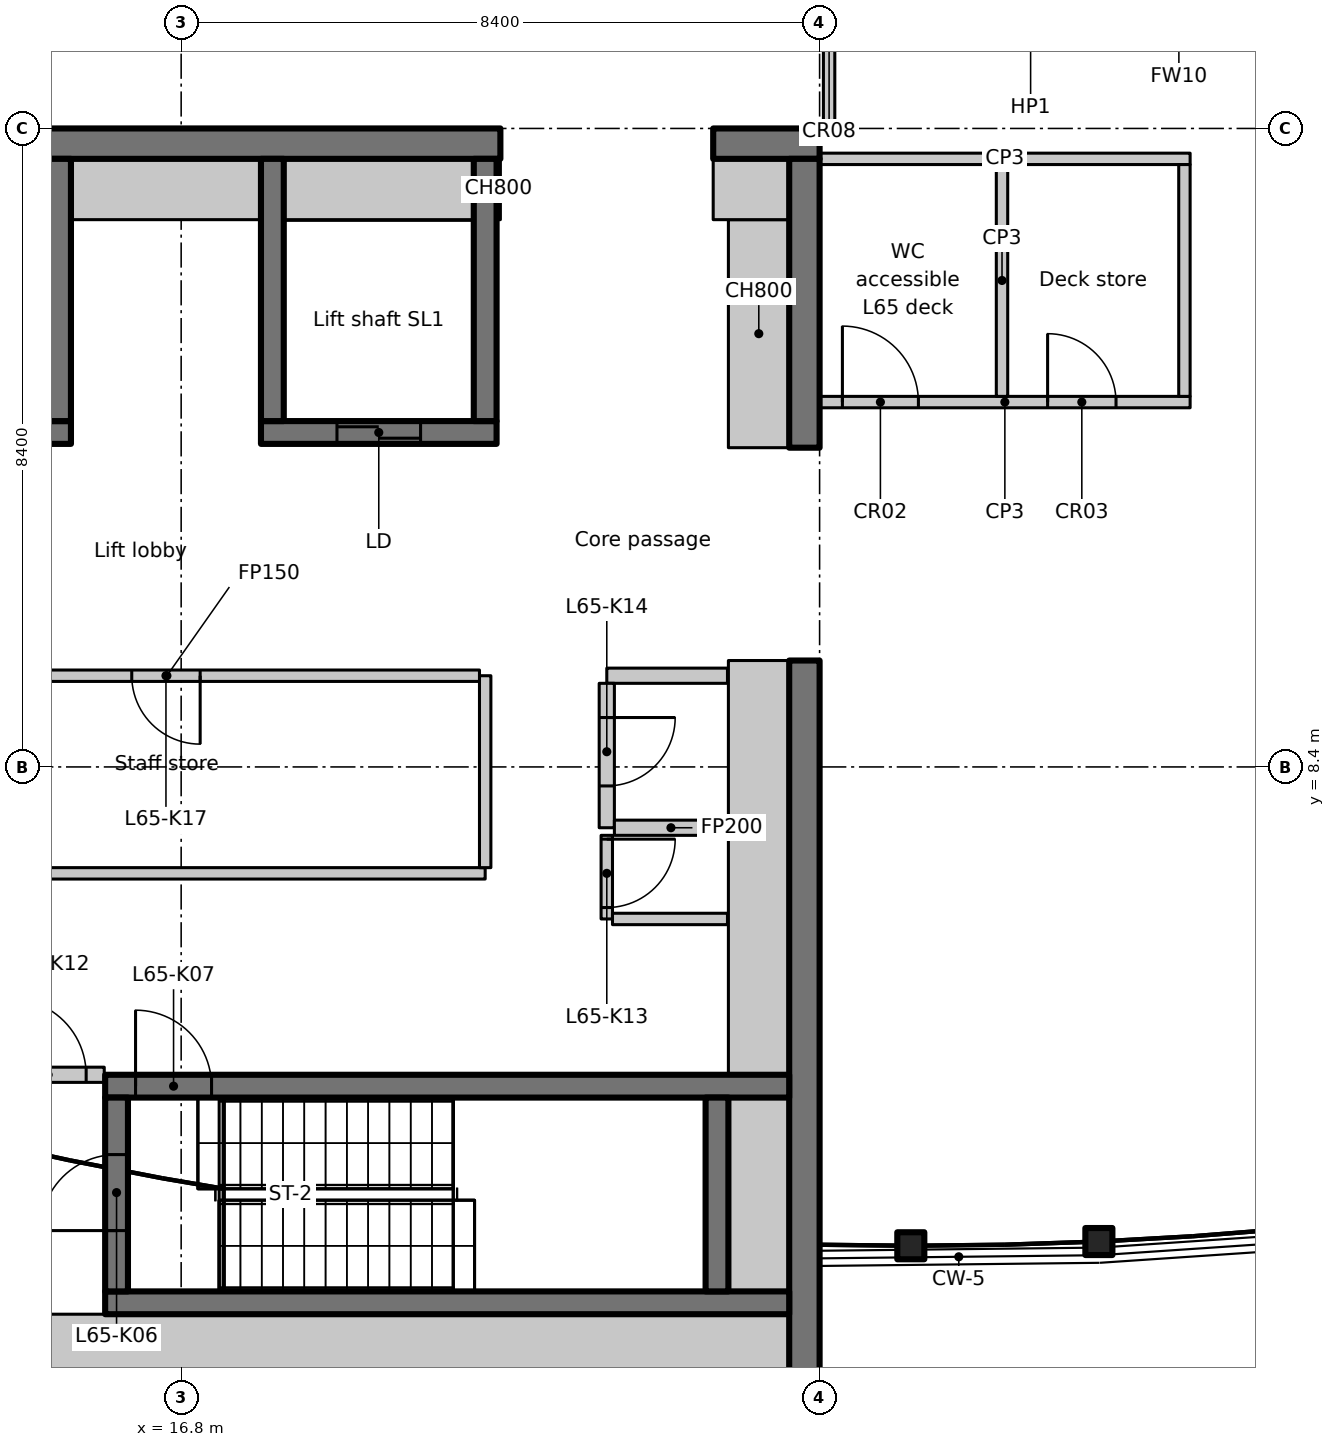
"""IFC4 building model, lengths in metres.
Left out: names, types, materials, properties, quantities, classifications, styles, units other than length and angle.
Written with IfcOpenShell. Run it as: python <this file> out.ifc"""

import sys

from ifc_helpers import new_model, si_unit, direction, frame, frame_2d, origin, origin_2d, place, context, subcontext, project, spatial, rectangle, hollow_circle, extrude, element, fill, save


model = new_model("IFC4")
c1 = context("Model", 3, precision=1e-05, world=origin(), true_north=direction((0.0, 1.0)))
c2 = subcontext(c1, "Body", "Model", "MODEL_VIEW")
j1 = project(units=[si_unit("LENGTHUNIT", "METRE"), si_unit("PLANEANGLEUNIT", "RADIAN")], contexts=[c1])
p1 = place(None, origin())
s1 = spatial("IfcSite", under=j1, at=p1, CompositionType="ELEMENT")
p2 = place(p1, origin())
s2 = spatial("IfcBuilding", under=s1, at=p2, CompositionType="ELEMENT")
p3 = place(p2, frame((0.0, 0.0, 256.2)))
s3 = spatial("IfcBuildingStorey", under=s2, at=p3, CompositionType="ELEMENT", Elevation=256.2)
for number, where, z_axis, x_axis in (
    (1, (28.875, 2.156, 0.0), (0.0, 0.0, 1.0), (1.0, 0.0, 0.0)),
    (2, (26.4, 2.1, 0.0), (0.0, 0.0, 1.0), (1.0, 0.0, 0.0)),
):
    element("IfcColumn", number, at=place(p3, frame(where, z_axis=z_axis, x_axis=x_axis)), inside=s3, PredefinedType="COLUMN", context=c2, shape_type="SweptSolid", body=[
        extrude(hollow_circle(Radius=0.178, WallThickness=0.012, at=origin_2d()), origin(), (0.0, 0.0, 1.0), 7.7),
    ])
p4 = place(p3, frame((-1.1, 16.6, 0.0), z_axis=(0.0, 0.0, 1.0), x_axis=(1.0, 0.0, 0.0)))
e3 = element("IfcWall", 3, at=p4, inside=s3, PredefinedType="SHEAR", context=c2, shape_type="SweptSolid", body=[
    extrude(rectangle(XDim=22.1, YDim=0.4, at=frame_2d((11.05, 0.0))), origin(), (0.0, 0.0, 1.0), 7.7),
])
p5 = place(p4, frame((3.15, 0.0, 0.0)))
e4 = element("IfcOpeningElement", 4, at=p5, cuts=e3, PredefinedType="OPENING", context=c2, shape_type="SweptSolid", body=[
    extrude(rectangle(XDim=1.1, YDim=2.3, at=frame_2d((0.55, 1.15))), frame((0.0, 0.21, 0.0), z_axis=(0.0, -1.0, 0.0), x_axis=(1.0, 0.0, 0.0)), (0.0, 0.0, 1.0), 0.42),
])
p6 = place(p3, frame((23.8, 16.6, 0.0), z_axis=(0.0, 0.0, 1.0), x_axis=(1.0, 0.0, 0.0)))
e5 = element("IfcWall", 5, at=p6, inside=s3, PredefinedType="SHEAR", context=c2, shape_type="SweptSolid", body=[
    extrude(rectangle(XDim=1.4, YDim=0.4, at=frame_2d((0.7, 0.0))), origin(), (0.0, 0.0, 1.0), 7.7),
])
p7 = place(p3, frame((25.0, 0.4, 0.0), z_axis=(0.0, 0.0, 1.0), x_axis=(0.0, 1.0, 0.0)))
e6 = element("IfcWall", 6, at=p7, inside=s3, PredefinedType="SHEAR", context=c2, shape_type="SweptSolid", body=[
    extrude(rectangle(XDim=9.4, YDim=0.4, at=frame_2d((4.7, 0.0))), origin(), (0.0, 0.0, 1.0), 7.7),
])
p8 = place(p3, frame((25.0, 12.6, 0.0), z_axis=(0.0, 0.0, 1.0), x_axis=(0.0, 1.0, 0.0)))
e7 = element("IfcWall", 7, at=p8, inside=s3, PredefinedType="SHEAR", context=c2, shape_type="SweptSolid", body=[
    extrude(rectangle(XDim=3.8, YDim=0.4, at=frame_2d((1.9, 0.0))), origin(), (0.0, 0.0, 1.0), 7.7),
])
p9 = place(p3, frame((24.4, 12.6, 0.0), z_axis=(0.0, 0.0, 1.0), x_axis=(0.0, 1.0, 0.0)))
e8 = element("IfcWall", 8, at=p9, inside=s3, PredefinedType="PARTITIONING", context=c2, shape_type="SweptSolid", body=[
    extrude(rectangle(XDim=3.0, YDim=0.8, at=frame_2d((1.5, 0.0))), origin(), (0.0, 0.0, 1.0), 7.7),
])
p10 = place(p3, frame((23.8, 16.0, 0.0), z_axis=(0.0, 0.0, 1.0), x_axis=(1.0, 0.0, 0.0)))
e9 = element("IfcWall", 9, at=p10, inside=s3, PredefinedType="PARTITIONING", context=c2, shape_type="SweptSolid", body=[
    extrude(rectangle(XDim=1.0, YDim=0.8, at=frame_2d((0.5, 0.0))), origin(), (0.0, 0.0, 1.0), 7.7),
])
p11 = place(p3, frame((0.4, 12.8, 0.0), z_axis=(0.0, 0.0, 1.0), x_axis=(1.0, 0.0, 0.0)))
e10 = element("IfcWall", 10, at=p11, inside=s3, PredefinedType="SHEAR", context=c2, shape_type="SweptSolid", body=[
    extrude(rectangle(XDim=14.95, YDim=0.3, at=frame_2d((7.475, 0.0))), origin(), (0.0, 0.0, 1.0), 7.7),
])
p12 = place(p3, frame((15.2, 12.95, 0.0), z_axis=(0.0, 0.0, 1.0), x_axis=(0.0, 1.0, 0.0)))
e11 = element("IfcWall", 11, at=p12, inside=s3, PredefinedType="SHEAR", context=c2, shape_type="SweptSolid", body=[
    extrude(rectangle(XDim=3.45, YDim=0.3, at=frame_2d((1.725, 0.0))), origin(), (0.0, 0.0, 1.0), 7.7),
])
p13 = place(p3, frame((17.85, 12.8, 0.0), z_axis=(0.0, 0.0, 1.0), x_axis=(1.0, 0.0, 0.0)))
e12 = element("IfcWall", 12, at=p13, inside=s3, PredefinedType="SHEAR", context=c2, shape_type="SweptSolid", body=[
    extrude(rectangle(XDim=3.1, YDim=0.3, at=frame_2d((1.55, 0.0))), origin(), (0.0, 0.0, 1.0), 7.7),
])
p14 = place(p13, frame((1.0, 0.0, 0.0)))
e13 = element("IfcOpeningElement", 13, at=p14, cuts=e12, PredefinedType="OPENING", context=c2, shape_type="SweptSolid", body=[
    extrude(rectangle(XDim=1.1, YDim=2.3, at=frame_2d((0.55, 1.15))), frame((0.0, 0.16, 0.0), z_axis=(0.0, -1.0, 0.0), x_axis=(1.0, 0.0, 0.0)), (0.0, 0.0, 1.0), 0.32),
])
for number, where, z_axis, x_axis in (
    (14, (18.0, 12.95, 0.0), (0.0, 0.0, 1.0), (0.0, 1.0, 0.0)),
    (15, (20.8, 12.95, 0.0), (0.0, 0.0, 1.0), (0.0, 1.0, 0.0)),
):
    element("IfcWall", number, at=place(p3, frame(where, z_axis=z_axis, x_axis=x_axis)), inside=s3, PredefinedType="SHEAR", context=c2, shape_type="SweptSolid", body=[
        extrude(rectangle(XDim=3.45, YDim=0.3, at=frame_2d((1.725, 0.0))), origin(), (0.0, 0.0, 1.0), 7.7),
    ])
p15 = place(p3, frame((15.8, 1.35, 0.0), z_axis=(0.0, 0.0, 1.0), x_axis=(1.0, 0.0, 0.0)))
e16 = element("IfcWall", 16, at=p15, inside=s3, PredefinedType="SHEAR", context=c2, shape_type="SweptSolid", body=[
    extrude(rectangle(XDim=9.0, YDim=0.3, at=frame_2d((4.5, 0.0))), origin(), (0.0, 0.0, 1.0), 7.7),
])
p16 = place(p3, frame((15.8, 4.2, 0.0), z_axis=(0.0, 0.0, 1.0), x_axis=(1.0, 0.0, 0.0)))
e17 = element("IfcWall", 17, at=p16, inside=s3, PredefinedType="SHEAR", context=c2, shape_type="SweptSolid", body=[
    extrude(rectangle(XDim=9.0, YDim=0.3, at=frame_2d((4.5, 0.0))), origin(), (0.0, 0.0, 1.0), 7.7),
])
p17 = place(p16, frame((0.4, 0.0, 0.0)))
e18 = element("IfcOpeningElement", 18, at=p17, cuts=e17, PredefinedType="OPENING", context=c2, shape_type="SweptSolid", body=[
    extrude(rectangle(XDim=1.0, YDim=2.1, at=frame_2d((0.5, 1.05))), frame((0.0, 0.16, 0.0), z_axis=(0.0, -1.0, 0.0), x_axis=(1.0, 0.0, 0.0)), (0.0, 0.0, 1.0), 0.32),
])
p18 = place(p3, frame((15.95, 1.5, 0.0), z_axis=(0.0, 0.0, 1.0), x_axis=(0.0, 1.0, 0.0)))
e19 = element("IfcWall", 19, at=p18, inside=s3, PredefinedType="SHEAR", context=c2, shape_type="SweptSolid", body=[
    extrude(rectangle(XDim=2.55, YDim=0.3, at=frame_2d((1.275, 0.0))), origin(), (0.0, 0.0, 1.0), 7.7),
])
p19 = place(p18, frame((0.8, 0.0, 0.0)))
e20 = element("IfcOpeningElement", 20, at=p19, cuts=e19, PredefinedType="OPENING", context=c2, shape_type="SweptSolid", body=[
    extrude(rectangle(XDim=1.0, YDim=2.1, at=frame_2d((0.5, 1.05))), frame((0.0, 0.16, 0.0), z_axis=(0.0, -1.0, 0.0), x_axis=(1.0, 0.0, 0.0)), (0.0, 0.0, 1.0), 0.32),
])
p20 = place(p3, frame((23.85, 1.5, 0.0), z_axis=(0.0, 0.0, 1.0), x_axis=(0.0, 1.0, 0.0)))
e21 = element("IfcWall", 21, at=p20, inside=s3, PredefinedType="SHEAR", context=c2, shape_type="SweptSolid", body=[
    extrude(rectangle(XDim=2.55, YDim=0.3, at=frame_2d((1.275, 0.0))), origin(), (0.0, 0.0, 1.0), 7.7),
])
p21 = place(p3, frame((13.362, 4.35, 0.0), z_axis=(0.0, 0.0, 1.0), x_axis=(1.0, 0.0, 0.0)))
e22 = element("IfcWall", 22, at=p21, inside=s3, PredefinedType="PARTITIONING", context=c2, shape_type="SweptSolid", body=[
    extrude(rectangle(XDim=2.426, YDim=0.2, at=frame_2d((1.213, 0.0))), origin(), (0.0, 0.0, 1.0), 7.7),
])
p22 = place(p21, frame((1.188, 0.0, 0.0)))
e23 = element("IfcOpeningElement", 23, at=p22, cuts=e22, PredefinedType="OPENING", context=c2, shape_type="SweptSolid", body=[
    extrude(rectangle(XDim=1.0, YDim=2.1, at=frame_2d((0.5, 1.05))), frame((0.0, 0.11, 0.0), z_axis=(0.0, -1.0, 0.0), x_axis=(1.0, 0.0, 0.0)), (0.0, 0.0, 1.0), 0.22),
])
p23 = place(p3, frame((23.988, 9.6, 0.0), z_axis=(0.0, 0.0, 1.0), x_axis=(-1.0, 0.0, 0.0)))
e24 = element("IfcWall", 24, at=p23, inside=s3, PredefinedType="PARTITIONING", context=c2, shape_type="SweptSolid", body=[
    extrude(rectangle(XDim=1.588, YDim=0.2, at=frame_2d((0.794, 0.0))), origin(), (0.0, 0.0, 1.0), 7.7),
])
p24 = place(p3, frame((22.4, 9.5, 0.0), z_axis=(0.0, 0.0, 1.0), x_axis=(0.0, -1.0, 0.0)))
e25 = element("IfcWall", 25, at=p24, inside=s3, PredefinedType="PARTITIONING", context=c2, shape_type="SweptSolid", body=[
    extrude(rectangle(XDim=1.9, YDim=0.2, at=frame_2d((0.95, 0.0))), origin(), (0.0, 0.0, 1.0), 7.7),
])
p25 = place(p24, frame((0.45, 0.0, 0.0)))
e26 = element("IfcOpeningElement", 26, at=p25, cuts=e25, PredefinedType="OPENING", context=c2, shape_type="SweptSolid", body=[
    extrude(rectangle(XDim=0.9, YDim=2.1, at=frame_2d((0.45, 1.05))), frame((0.0, 0.11, 0.0), z_axis=(0.0, -1.0, 0.0), x_axis=(1.0, 0.0, 0.0)), (0.0, 0.0, 1.0), 0.22),
])
p26 = place(p3, frame((22.5, 7.6, 0.0), z_axis=(0.0, 0.0, 1.0), x_axis=(1.0, 0.0, 0.0)))
e27 = element("IfcWall", 27, at=p26, inside=s3, PredefinedType="PARTITIONING", context=c2, shape_type="SweptSolid", body=[
    extrude(rectangle(XDim=1.488, YDim=0.2, at=frame_2d((0.744, 0.0))), origin(), (0.0, 0.0, 1.0), 7.7),
])
p27 = place(p3, frame((12.5, 7.0, 0.0), z_axis=(0.0, 0.0, 1.0), x_axis=(1.0, 0.0, 0.0)))
e28 = element("IfcWall", 28, at=p27, inside=s3, PredefinedType="PARTITIONING", context=c2, shape_type="SweptSolid", body=[
    extrude(rectangle(XDim=8.3, YDim=0.15, at=frame_2d((4.15, 0.0))), origin(), (0.0, 0.0, 1.0), 7.7),
])
p28 = place(p3, frame((20.8, 7.075, 0.0), z_axis=(0.0, 0.0, 1.0), x_axis=(0.0, 1.0, 0.0)))
e29 = element("IfcWall", 29, at=p28, inside=s3, PredefinedType="PARTITIONING", context=c2, shape_type="SweptSolid", body=[
    extrude(rectangle(XDim=2.525, YDim=0.15, at=frame_2d((1.263, 0.0))), origin(), (0.0, 0.0, 1.0), 7.7),
])
p29 = place(p3, frame((20.725, 9.6, 0.0), z_axis=(0.0, 0.0, 1.0), x_axis=(-1.0, 0.0, 0.0)))
e30 = element("IfcWall", 30, at=p29, inside=s3, PredefinedType="PARTITIONING", context=c2, shape_type="SweptSolid", body=[
    extrude(rectangle(XDim=8.225, YDim=0.15, at=frame_2d((4.113, 0.0))), origin(), (0.0, 0.0, 1.0), 7.7),
])
p30 = place(p29, frame((3.675, 0.0, 0.0)))
e31 = element("IfcOpeningElement", 31, at=p30, cuts=e30, PredefinedType="OPENING", context=c2, shape_type="SweptSolid", body=[
    extrude(rectangle(XDim=0.9, YDim=2.1, at=frame_2d((0.45, 1.05))), frame((0.0, 0.085, 0.0), z_axis=(0.0, -1.0, 0.0), x_axis=(1.0, 0.0, 0.0)), (0.0, 0.0, 1.0), 0.17),
])
p31 = place(p3, frame((22.4, 7.5, 0.0), z_axis=(0.0, 0.0, 1.0), x_axis=(0.0, -1.0, 0.0)))
e32 = element("IfcWall", 32, at=p31, inside=s3, PredefinedType="PARTITIONING", context=c2, shape_type="SweptSolid", body=[
    extrude(rectangle(XDim=1.1, YDim=0.15, at=frame_2d((0.55, 0.0))), origin(), (0.0, 0.0, 1.0), 7.7),
])
p32 = place(p31, frame((0.05, 0.0, 0.0)))
e33 = element("IfcOpeningElement", 33, at=p32, cuts=e32, PredefinedType="OPENING", context=c2, shape_type="SweptSolid", body=[
    extrude(rectangle(XDim=0.9, YDim=2.1, at=frame_2d((0.45, 1.05))), frame((0.0, 0.085, 0.0), z_axis=(0.0, -1.0, 0.0), x_axis=(1.0, 0.0, 0.0)), (0.0, 0.0, 1.0), 0.17),
])
p33 = place(p3, frame((22.475, 6.4, 0.0), z_axis=(0.0, 0.0, 1.0), x_axis=(1.0, 0.0, 0.0)))
e34 = element("IfcWall", 34, at=p33, inside=s3, PredefinedType="PARTITIONING", context=c2, shape_type="SweptSolid", body=[
    extrude(rectangle(XDim=1.513, YDim=0.15, at=frame_2d((0.756, 0.0))), origin(), (0.0, 0.0, 1.0), 7.7),
])
for number, where, z_axis, x_axis in (
    (35, (15.35, 16.0, 0.0), (0.0, 0.0, 1.0), (1.0, 0.0, 0.0)),
    (36, (18.15, 16.0, 0.0), (0.0, 0.0, 1.0), (1.0, 0.0, 0.0)),
):
    element("IfcWall", number, at=place(p3, frame(where, z_axis=z_axis, x_axis=x_axis)), inside=s3, PredefinedType="PARTITIONING", context=c2, shape_type="SweptSolid", body=[
        extrude(rectangle(XDim=2.5, YDim=0.8, at=frame_2d((1.25, 0.0))), origin(), (0.0, 0.0, 1.0), 7.7),
    ])
p34 = place(p3, frame((20.95, 16.0, 0.0), z_axis=(0.0, 0.0, 1.0), x_axis=(1.0, 0.0, 0.0)))
e37 = element("IfcWall", 37, at=p34, inside=s3, PredefinedType="PARTITIONING", context=c2, shape_type="SweptSolid", body=[
    extrude(rectangle(XDim=0.05, YDim=0.8, at=frame_2d((0.025, 0.0))), origin(), (0.0, 0.0, 1.0), 7.7),
])
p35 = place(p3, frame((13.35, 0.8, 0.0), z_axis=(0.0, 0.0, 1.0), x_axis=(1.0, 0.0, 0.0)))
e38 = element("IfcWall", 38, at=p35, inside=s3, PredefinedType="PARTITIONING", context=c2, shape_type="SweptSolid", body=[
    extrude(rectangle(XDim=11.45, YDim=0.8, at=frame_2d((5.725, 0.0))), origin(), (0.0, 0.0, 1.0), 7.7),
])
p36 = place(p3, frame((24.4, 1.5, 0.0), z_axis=(0.0, 0.0, 1.0), x_axis=(0.0, 1.0, 0.0)))
e39 = element("IfcWall", 39, at=p36, inside=s3, PredefinedType="PARTITIONING", context=c2, shape_type="SweptSolid", body=[
    extrude(rectangle(XDim=2.55, YDim=0.8, at=frame_2d((1.275, 0.0))), origin(), (0.0, 0.0, 1.0), 7.7),
])
p37 = place(p3, frame((24.4, 4.35, 0.0), z_axis=(0.0, 0.0, 1.0), x_axis=(0.0, 1.0, 0.0)))
e40 = element("IfcWall", 40, at=p37, inside=s3, PredefinedType="PARTITIONING", context=c2, shape_type="SweptSolid", body=[
    extrude(rectangle(XDim=5.45, YDim=0.8, at=frame_2d((2.725, 0.0))), origin(), (0.0, 0.0, 1.0), 7.7),
])
p38 = place(p3, frame((25.2, 13.2, 0.0), z_axis=(0.0, 0.0, 1.0), x_axis=(1.0, 0.0, 0.0)))
e41 = element("IfcWall", 41, at=p38, inside=s3, PredefinedType="PARTITIONING", context=c2, shape_type="SweptSolid", body=[
    extrude(rectangle(XDim=4.875, YDim=0.15, at=frame_2d((2.438, 0.0))), origin(), (0.0, 0.0, 1.0), 7.7),
])
p39 = place(p38, frame((0.3, 0.0, 0.0)))
e42 = element("IfcOpeningElement", 42, at=p39, cuts=e41, PredefinedType="OPENING", context=c2, shape_type="SweptSolid", body=[
    extrude(rectangle(XDim=1.0, YDim=2.1, at=frame_2d((0.5, 1.05))), frame((0.0, 0.085, 0.0), z_axis=(0.0, -1.0, 0.0), x_axis=(1.0, 0.0, 0.0)), (0.0, 0.0, 1.0), 0.17),
])
p40 = place(p38, frame((3.0, 0.0, 0.0)))
e43 = element("IfcOpeningElement", 43, at=p40, cuts=e41, PredefinedType="OPENING", context=c2, shape_type="SweptSolid", body=[
    extrude(rectangle(XDim=0.9, YDim=2.1, at=frame_2d((0.45, 1.05))), frame((0.0, 0.085, 0.0), z_axis=(0.0, -1.0, 0.0), x_axis=(1.0, 0.0, 0.0)), (0.0, 0.0, 1.0), 0.17),
])
p41 = place(p3, frame((25.2, 16.4, 0.0), z_axis=(0.0, 0.0, 1.0), x_axis=(1.0, 0.0, 0.0)))
e44 = element("IfcWall", 44, at=p41, inside=s3, PredefinedType="PARTITIONING", context=c2, shape_type="SweptSolid", body=[
    extrude(rectangle(XDim=4.875, YDim=0.15, at=frame_2d((2.438, 0.0))), origin(), (0.0, 0.0, 1.0), 7.7),
])
for number, where, z_axis, x_axis in (
    (45, (30.0, 13.275, 0.0), (0.0, 0.0, 1.0), (0.0, 1.0, 0.0)),
    (46, (27.6, 13.275, 0.0), (0.0, 0.0, 1.0), (0.0, 1.0, 0.0)),
):
    element("IfcWall", number, at=place(p3, frame(where, z_axis=z_axis, x_axis=x_axis)), inside=s3, PredefinedType="PARTITIONING", context=c2, shape_type="SweptSolid", body=[
        extrude(rectangle(XDim=3.05, YDim=0.15, at=frame_2d((1.525, 0.0))), origin(), (0.0, 0.0, 1.0), 7.7),
    ])
p42 = place(p3, frame((25.325, 16.6, 0.0), z_axis=(0.0, 0.0, 1.0), x_axis=(0.0, 1.0, 0.0)))
e47 = element("IfcWall", 47, at=p42, inside=s3, PredefinedType="PARTITIONING", context=c2, shape_type="SweptSolid", body=[
    extrude(rectangle(XDim=4.1, YDim=0.15, at=frame_2d((2.05, 0.0))), origin(), (0.0, 0.0, 1.0), 7.7),
])
p43 = place(p42, frame((1.55, 0.0, 0.0)))
e48 = element("IfcOpeningElement", 48, at=p43, cuts=e47, PredefinedType="OPENING", context=c2, shape_type="SweptSolid", body=[
    extrude(rectangle(XDim=1.0, YDim=2.1, at=frame_2d((0.5, 1.05))), frame((0.0, 0.085, 0.0), z_axis=(0.0, -1.0, 0.0), x_axis=(1.0, 0.0, 0.0)), (0.0, 0.0, 1.0), 0.17),
])
p44 = place(p14, origin())
e49 = element("IfcDoor", 49, at=p44, inside=s3, OperationType="SLIDING_TO_LEFT", PredefinedType="DOOR", context=c2, shape_type="SweptSolid", body=[
    extrude(rectangle(XDim=1.1, YDim=2.3, at=frame_2d((0.55, 1.15))), frame((0.0, 0.025, 0.0), z_axis=(0.0, -1.0, 0.0), x_axis=(1.0, 0.0, 0.0)), (0.0, 0.0, 1.0), 0.05),
])
fill(e13, e49)
p45 = place(p19, origin())
e50 = element("IfcDoor", 50, at=p45, inside=s3, OperationType="SINGLE_SWING_LEFT", PredefinedType="DOOR", context=c2, shape_type="SweptSolid", body=[
    extrude(rectangle(XDim=1.0, YDim=2.1, at=frame_2d((0.5, 1.05))), frame((0.0, 0.025, 0.0), z_axis=(0.0, -1.0, 0.0), x_axis=(1.0, 0.0, 0.0)), (0.0, 0.0, 1.0), 0.05),
])
fill(e20, e50)
p46 = place(p17, origin())
e51 = element("IfcDoor", 51, at=p46, inside=s3, OperationType="SINGLE_SWING_RIGHT", PredefinedType="DOOR", context=c2, shape_type="SweptSolid", body=[
    extrude(rectangle(XDim=1.0, YDim=2.1, at=frame_2d((0.5, 1.05))), frame((0.0, 0.025, 0.0), z_axis=(0.0, -1.0, 0.0), x_axis=(1.0, 0.0, 0.0)), (0.0, 0.0, 1.0), 0.05),
])
fill(e18, e51)
p47 = place(p22, origin())
e52 = element("IfcDoor", 52, at=p47, inside=s3, OperationType="SINGLE_SWING_LEFT", PredefinedType="DOOR", context=c2, shape_type="SweptSolid", body=[
    extrude(rectangle(XDim=1.0, YDim=2.1, at=frame_2d((0.5, 1.05))), frame((0.0, 0.025, 0.0), z_axis=(0.0, -1.0, 0.0), x_axis=(1.0, 0.0, 0.0)), (0.0, 0.0, 1.0), 0.05),
])
fill(e23, e52)
p48 = place(p32, origin())
e53 = element("IfcDoor", 53, at=p48, inside=s3, OperationType="SINGLE_SWING_RIGHT", PredefinedType="DOOR", context=c2, shape_type="SweptSolid", body=[
    extrude(rectangle(XDim=0.9, YDim=2.1, at=frame_2d((0.45, 1.05))), frame((0.0, 0.025, 0.0), z_axis=(0.0, -1.0, 0.0), x_axis=(1.0, 0.0, 0.0)), (0.0, 0.0, 1.0), 0.05),
])
fill(e33, e53)
p49 = place(p25, origin())
e54 = element("IfcDoor", 54, at=p49, inside=s3, OperationType="SINGLE_SWING_LEFT", PredefinedType="DOOR", context=c2, shape_type="SweptSolid", body=[
    extrude(rectangle(XDim=0.9, YDim=2.1, at=frame_2d((0.45, 1.05))), frame((0.0, 0.025, 0.0), z_axis=(0.0, -1.0, 0.0), x_axis=(1.0, 0.0, 0.0)), (0.0, 0.0, 1.0), 0.05),
])
fill(e26, e54)
p50 = place(p30, origin())
e55 = element("IfcDoor", 55, at=p50, inside=s3, OperationType="SINGLE_SWING_RIGHT", PredefinedType="DOOR", context=c2, shape_type="SweptSolid", body=[
    extrude(rectangle(XDim=0.9, YDim=2.1, at=frame_2d((0.45, 1.05))), frame((0.0, 0.025, 0.0), z_axis=(0.0, -1.0, 0.0), x_axis=(1.0, 0.0, 0.0)), (0.0, 0.0, 1.0), 0.05),
])
fill(e31, e55)
p51 = place(p39, origin())
e56 = element("IfcDoor", 56, at=p51, inside=s3, OperationType="SINGLE_SWING_RIGHT", PredefinedType="DOOR", context=c2, shape_type="SweptSolid", body=[
    extrude(rectangle(XDim=1.0, YDim=2.1, at=frame_2d((0.5, 1.05))), frame((0.0, 0.025, 0.0), z_axis=(0.0, -1.0, 0.0), x_axis=(1.0, 0.0, 0.0)), (0.0, 0.0, 1.0), 0.05),
])
fill(e42, e56)
p52 = place(p40, origin())
e57 = element("IfcDoor", 57, at=p52, inside=s3, OperationType="SINGLE_SWING_LEFT", PredefinedType="DOOR", context=c2, shape_type="SweptSolid", body=[
    extrude(rectangle(XDim=0.9, YDim=2.1, at=frame_2d((0.45, 1.05))), frame((0.0, 0.025, 0.0), z_axis=(0.0, -1.0, 0.0), x_axis=(1.0, 0.0, 0.0)), (0.0, 0.0, 1.0), 0.05),
])
fill(e43, e57)
save(model, sys.argv[1])
